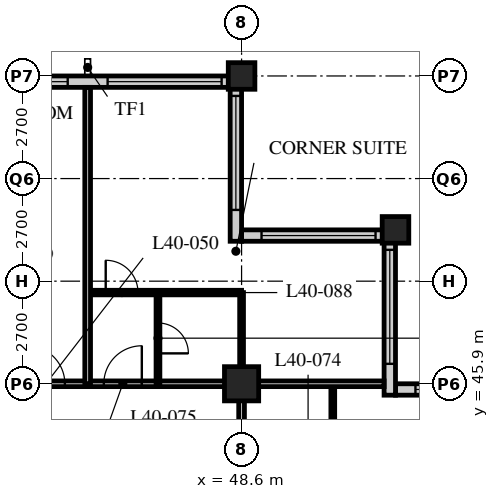
"""IFC4 building model, lengths in metres.
Left out: names, types, materials, properties, quantities, classifications, styles, units other than length and angle.
Written with IfcOpenShell. Run it as: python <this file> out.ifc"""

import sys

from ifc_helpers import new_model, si_unit, direction, frame, frame_2d, origin, origin_2d, place, context, subcontext, project, spatial, rectangle, hollow_rectangle, extrude, element, fill, save


model = new_model("IFC4")
c1 = context("Model", 3, precision=1e-05, world=origin(), true_north=direction((0.0, 1.0)))
c2 = subcontext(c1, "Body", "Model", "MODEL_VIEW")
j1 = project(units=[si_unit("LENGTHUNIT", "METRE"), si_unit("PLANEANGLEUNIT", "RADIAN")], contexts=[c1])
p1 = place(None, origin())
s1 = spatial("IfcSite", under=j1, at=p1, CompositionType="ELEMENT")
p2 = place(p1, origin())
s2 = spatial("IfcBuilding", under=s1, at=p2, CompositionType="ELEMENT")
p3 = place(p2, frame((0.0, 0.0, 154.4)))
s3 = spatial("IfcBuildingStorey", under=s2, at=p3, CompositionType="ELEMENT", Elevation=154.4)
p4 = place(p3, frame((48.6, 45.9, 0.0), z_axis=(0.0, 0.0, 1.0), x_axis=(1.0, 0.0, 0.0)))
e1 = element("IfcColumn", 1, at=p4, inside=s3, PredefinedType="COLUMN", context=c2, shape_type="SweptSolid", body=[
    extrude(hollow_rectangle(XDim=0.9, YDim=0.9, WallThickness=0.1, at=origin_2d()), origin(), (0.0, 0.0, 1.0), 3.4),
])
for number, where, z_axis, x_axis in (
    (2, (48.6, 54.0, 0.0), (0.0, 0.0, 1.0), (1.0, 0.0, 0.0)),
    (3, (52.65, 49.95, 0.0), (0.0, 0.0, 1.0), (1.0, 0.0, 0.0)),
):
    element("IfcColumn", number, at=place(p3, frame(where, z_axis=z_axis, x_axis=x_axis)), inside=s3, PredefinedType="COLUMN", context=c2, shape_type="SweptSolid", body=[
        extrude(hollow_rectangle(XDim=0.7, YDim=0.7, WallThickness=0.07, at=origin_2d()), origin(), (0.0, 0.0, 1.0), 3.4),
    ])
p5 = place(p3, frame((56.4, 45.75, 0.0), z_axis=(0.0, 0.0, 1.0), x_axis=(-1.0, 0.0, 0.0)))
e4 = element("IfcWall", 4, at=p5, inside=s3, PredefinedType="SOLIDWALL", context=c2, shape_type="SweptSolid", body=[
    extrude(rectangle(XDim=3.75, YDim=0.3, at=frame_2d((1.875, 0.0))), origin(), (0.0, 0.0, 1.0), 2.15),
])
p6 = place(p5, frame((0.225, 0.0, 0.9)))
e5 = element("IfcOpeningElement", 5, at=p6, cuts=e4, PredefinedType="OPENING", context=c2, shape_type="SweptSolid", body=[
    extrude(rectangle(XDim=3.0, YDim=1.2, at=frame_2d((1.5, 0.6))), frame((0.0, 0.16, 0.0), z_axis=(0.0, -1.0, 0.0), x_axis=(1.0, 0.0, 0.0)), (0.0, 0.0, 1.0), 0.32),
])
p7 = place(p3, frame((52.5, 45.6, 0.0), z_axis=(0.0, 0.0, 1.0), x_axis=(0.0, 1.0, 0.0)))
e6 = element("IfcWall", 6, at=p7, inside=s3, PredefinedType="SOLIDWALL", context=c2, shape_type="SweptSolid", body=[
    extrude(rectangle(XDim=4.35, YDim=0.3, at=frame_2d((2.175, 0.0))), origin(), (0.0, 0.0, 1.0), 2.45),
])
p8 = place(p7, frame((0.825, 0.0, 0.9)))
e7 = element("IfcOpeningElement", 7, at=p8, cuts=e6, PredefinedType="OPENING", context=c2, shape_type="SweptSolid", body=[
    extrude(rectangle(XDim=3.0, YDim=1.2, at=frame_2d((1.5, 0.6))), frame((0.0, 0.16, 0.0), z_axis=(0.0, -1.0, 0.0), x_axis=(1.0, 0.0, 0.0)), (0.0, 0.0, 1.0), 0.32),
])
p9 = place(p3, frame((52.35, 49.8, 0.0), z_axis=(0.0, 0.0, 1.0), x_axis=(-1.0, 0.0, 0.0)))
e8 = element("IfcWall", 8, at=p9, inside=s3, PredefinedType="SOLIDWALL", context=c2, shape_type="SweptSolid", body=[
    extrude(rectangle(XDim=3.75, YDim=0.3, at=frame_2d((1.875, 0.0))), origin(), (0.0, 0.0, 1.0), 2.45),
])
p10 = place(p9, frame((0.225, 0.0, 0.9)))
e9 = element("IfcOpeningElement", 9, at=p10, cuts=e8, PredefinedType="OPENING", context=c2, shape_type="SweptSolid", body=[
    extrude(rectangle(XDim=3.0, YDim=1.2, at=frame_2d((1.5, 0.6))), frame((0.0, 0.16, 0.0), z_axis=(0.0, -1.0, 0.0), x_axis=(1.0, 0.0, 0.0)), (0.0, 0.0, 1.0), 0.32),
])
p11 = place(p3, frame((48.45, 49.65, 0.0), z_axis=(0.0, 0.0, 1.0), x_axis=(0.0, 1.0, 0.0)))
e10 = element("IfcWall", 10, at=p11, inside=s3, PredefinedType="SOLIDWALL", context=c2, shape_type="SweptSolid", body=[
    extrude(rectangle(XDim=4.35, YDim=0.3, at=frame_2d((2.175, 0.0))), origin(), (0.0, 0.0, 1.0), 2.15),
])
p12 = place(p11, frame((0.825, 0.0, 0.9)))
e11 = element("IfcOpeningElement", 11, at=p12, cuts=e10, PredefinedType="OPENING", context=c2, shape_type="SweptSolid", body=[
    extrude(rectangle(XDim=3.0, YDim=1.2, at=frame_2d((1.5, 0.6))), frame((0.0, 0.16, 0.0), z_axis=(0.0, -1.0, 0.0), x_axis=(1.0, 0.0, 0.0)), (0.0, 0.0, 1.0), 0.32),
])
p13 = place(p3, frame((48.3, 53.85, 0.0), z_axis=(0.0, 0.0, 1.0), x_axis=(-1.0, 0.0, 0.0)))
e12 = element("IfcWall", 12, at=p13, inside=s3, PredefinedType="SOLIDWALL", context=c2, shape_type="SweptSolid", body=[
    extrude(rectangle(XDim=40.2, YDim=0.3, at=frame_2d((20.1, 0.0))), origin(), (0.0, 0.0, 1.0), 2.15),
])
p14 = place(p13, frame((0.225, 0.0, 0.9)))
e13 = element("IfcOpeningElement", 13, at=p14, cuts=e12, PredefinedType="OPENING", context=c2, shape_type="SweptSolid", body=[
    extrude(rectangle(XDim=3.0, YDim=1.2, at=frame_2d((1.5, 0.6))), frame((0.0, 0.16, 0.0), z_axis=(0.0, -1.0, 0.0), x_axis=(1.0, 0.0, 0.0)), (0.0, 0.0, 1.0), 0.32),
])
p15 = place(p13, frame((4.275, 0.0, 0.9)))
e14 = element("IfcOpeningElement", 14, at=p15, cuts=e12, PredefinedType="OPENING", context=c2, shape_type="SweptSolid", body=[
    extrude(rectangle(XDim=3.0, YDim=1.2, at=frame_2d((1.5, 0.6))), frame((0.0, 0.16, 0.0), z_axis=(0.0, -1.0, 0.0), x_axis=(1.0, 0.0, 0.0)), (0.0, 0.0, 1.0), 0.32),
])
p16 = place(p13, frame((8.325, 0.0, 0.9)))
e15 = element("IfcOpeningElement", 15, at=p16, cuts=e12, PredefinedType="OPENING", context=c2, shape_type="SweptSolid", body=[
    extrude(rectangle(XDim=3.0, YDim=1.2, at=frame_2d((1.5, 0.6))), frame((0.0, 0.16, 0.0), z_axis=(0.0, -1.0, 0.0), x_axis=(1.0, 0.0, 0.0)), (0.0, 0.0, 1.0), 0.32),
])
p17 = place(p13, frame((12.375, 0.0, 0.9)))
e16 = element("IfcOpeningElement", 16, at=p17, cuts=e12, PredefinedType="OPENING", context=c2, shape_type="SweptSolid", body=[
    extrude(rectangle(XDim=3.0, YDim=1.2, at=frame_2d((1.5, 0.6))), frame((0.0, 0.16, 0.0), z_axis=(0.0, -1.0, 0.0), x_axis=(1.0, 0.0, 0.0)), (0.0, 0.0, 1.0), 0.32),
])
p18 = place(p13, frame((16.425, 0.0, 0.9)))
e17 = element("IfcOpeningElement", 17, at=p18, cuts=e12, PredefinedType="OPENING", context=c2, shape_type="SweptSolid", body=[
    extrude(rectangle(XDim=3.0, YDim=1.2, at=frame_2d((1.5, 0.6))), frame((0.0, 0.16, 0.0), z_axis=(0.0, -1.0, 0.0), x_axis=(1.0, 0.0, 0.0)), (0.0, 0.0, 1.0), 0.32),
])
p19 = place(p13, frame((20.475, 0.0, 0.9)))
e18 = element("IfcOpeningElement", 18, at=p19, cuts=e12, PredefinedType="OPENING", context=c2, shape_type="SweptSolid", body=[
    extrude(rectangle(XDim=3.0, YDim=1.2, at=frame_2d((1.5, 0.6))), frame((0.0, 0.16, 0.0), z_axis=(0.0, -1.0, 0.0), x_axis=(1.0, 0.0, 0.0)), (0.0, 0.0, 1.0), 0.32),
])
p20 = place(p13, frame((24.525, 0.0, 0.9)))
e19 = element("IfcOpeningElement", 19, at=p20, cuts=e12, PredefinedType="OPENING", context=c2, shape_type="SweptSolid", body=[
    extrude(rectangle(XDim=3.0, YDim=1.2, at=frame_2d((1.5, 0.6))), frame((0.0, 0.16, 0.0), z_axis=(0.0, -1.0, 0.0), x_axis=(1.0, 0.0, 0.0)), (0.0, 0.0, 1.0), 0.32),
])
p21 = place(p13, frame((28.575, 0.0, 0.9)))
e20 = element("IfcOpeningElement", 20, at=p21, cuts=e12, PredefinedType="OPENING", context=c2, shape_type="SweptSolid", body=[
    extrude(rectangle(XDim=3.0, YDim=1.2, at=frame_2d((1.5, 0.6))), frame((0.0, 0.16, 0.0), z_axis=(0.0, -1.0, 0.0), x_axis=(1.0, 0.0, 0.0)), (0.0, 0.0, 1.0), 0.32),
])
p22 = place(p13, frame((32.625, 0.0, 0.9)))
e21 = element("IfcOpeningElement", 21, at=p22, cuts=e12, PredefinedType="OPENING", context=c2, shape_type="SweptSolid", body=[
    extrude(rectangle(XDim=3.0, YDim=1.2, at=frame_2d((1.5, 0.6))), frame((0.0, 0.16, 0.0), z_axis=(0.0, -1.0, 0.0), x_axis=(1.0, 0.0, 0.0)), (0.0, 0.0, 1.0), 0.32),
])
p23 = place(p13, frame((36.675, 0.0, 0.9)))
e22 = element("IfcOpeningElement", 22, at=p23, cuts=e12, PredefinedType="OPENING", context=c2, shape_type="SweptSolid", body=[
    extrude(rectangle(XDim=3.0, YDim=1.2, at=frame_2d((1.5, 0.6))), frame((0.0, 0.16, 0.0), z_axis=(0.0, -1.0, 0.0), x_axis=(1.0, 0.0, 0.0)), (0.0, 0.0, 1.0), 0.32),
])
p24 = place(p3, frame((8.1, 45.9, 0.0), z_axis=(0.0, 0.0, 1.0), x_axis=(1.0, 0.0, 0.0)))
e23 = element("IfcWall", 23, at=p24, inside=s3, PredefinedType="PARTITIONING", context=c2, shape_type="SweptSolid", body=[
    extrude(rectangle(XDim=40.5, YDim=0.15, at=frame_2d((20.25, 0.0))), origin(), (0.0, 0.0, 1.0), 2.15),
])
p25 = place(p24, frame((9.625, 0.0, 0.0)))
e24 = element("IfcOpeningElement", 24, at=p25, cuts=e23, PredefinedType="OPENING", context=c2, shape_type="SweptSolid", body=[
    extrude(rectangle(XDim=1.0, YDim=2.1, at=frame_2d((0.5, 1.05))), frame((0.0, 0.085, 0.0), z_axis=(0.0, -1.0, 0.0), x_axis=(1.0, 0.0, 0.0)), (0.0, 0.0, 1.0), 0.17),
])
p26 = place(p24, frame((21.775, 0.0, 0.0)))
e25 = element("IfcOpeningElement", 25, at=p26, cuts=e23, PredefinedType="OPENING", context=c2, shape_type="SweptSolid", body=[
    extrude(rectangle(XDim=1.0, YDim=2.1, at=frame_2d((0.5, 1.05))), frame((0.0, 0.085, 0.0), z_axis=(0.0, -1.0, 0.0), x_axis=(1.0, 0.0, 0.0)), (0.0, 0.0, 1.0), 0.17),
])
p27 = place(p24, frame((28.95, 0.0, 0.0)))
e26 = element("IfcOpeningElement", 26, at=p27, cuts=e23, PredefinedType="OPENING", context=c2, shape_type="SweptSolid", body=[
    extrude(rectangle(XDim=1.0, YDim=2.1, at=frame_2d((0.5, 1.05))), frame((0.0, 0.085, 0.0), z_axis=(0.0, -1.0, 0.0), x_axis=(1.0, 0.0, 0.0)), (0.0, 0.0, 1.0), 0.17),
])
p28 = place(p24, frame((34.85, 0.0, 0.0)))
e27 = element("IfcOpeningElement", 27, at=p28, cuts=e23, PredefinedType="OPENING", context=c2, shape_type="SweptSolid", body=[
    extrude(rectangle(XDim=1.0, YDim=2.1, at=frame_2d((0.5, 1.05))), frame((0.0, 0.085, 0.0), z_axis=(0.0, -1.0, 0.0), x_axis=(1.0, 0.0, 0.0)), (0.0, 0.0, 1.0), 0.17),
])
p29 = place(p24, frame((36.875, 0.0, 0.0)))
e28 = element("IfcOpeningElement", 28, at=p29, cuts=e23, PredefinedType="OPENING", context=c2, shape_type="SweptSolid", body=[
    extrude(rectangle(XDim=1.0, YDim=2.1, at=frame_2d((0.5, 1.05))), frame((0.0, 0.085, 0.0), z_axis=(0.0, -1.0, 0.0), x_axis=(1.0, 0.0, 0.0)), (0.0, 0.0, 1.0), 0.17),
])
p30 = place(p24, frame((2.625, 0.0, 0.0)))
e29 = element("IfcOpeningElement", 29, at=p30, cuts=e23, PredefinedType="OPENING", context=c2, shape_type="SweptSolid", body=[
    extrude(rectangle(XDim=1.0, YDim=2.1, at=frame_2d((0.5, 1.05))), frame((0.0, 0.085, 0.0), z_axis=(0.0, -1.0, 0.0), x_axis=(1.0, 0.0, 0.0)), (0.0, 0.0, 1.0), 0.17),
])
p31 = place(p3, frame((48.6, 17.55, 0.0), z_axis=(0.0, 0.0, 1.0), x_axis=(0.0, 1.0, 0.0)))
e30 = element("IfcWall", 30, at=p31, inside=s3, PredefinedType="PARTITIONING", context=c2, shape_type="SweptSolid", body=[
    extrude(rectangle(XDim=28.35, YDim=0.15, at=frame_2d((14.175, 0.0))), origin(), (0.0, 0.0, 1.0), 2.15),
])
p32 = place(p31, frame((0.3, 0.0, 0.0)))
e31 = element("IfcOpeningElement", 31, at=p32, cuts=e30, PredefinedType="OPENING", context=c2, shape_type="SweptSolid", body=[
    extrude(rectangle(XDim=1.0, YDim=2.1, at=frame_2d((0.5, 1.05))), frame((0.0, 0.085, 0.0), z_axis=(0.0, -1.0, 0.0), x_axis=(1.0, 0.0, 0.0)), (0.0, 0.0, 1.0), 0.17),
])
p33 = place(p31, frame((6.5, 0.0, 0.0)))
e32 = element("IfcOpeningElement", 32, at=p33, cuts=e30, PredefinedType="OPENING", context=c2, shape_type="SweptSolid", body=[
    extrude(rectangle(XDim=1.0, YDim=2.1, at=frame_2d((0.5, 1.05))), frame((0.0, 0.085, 0.0), z_axis=(0.0, -1.0, 0.0), x_axis=(1.0, 0.0, 0.0)), (0.0, 0.0, 1.0), 0.17),
])
p34 = place(p31, frame((13.675, 0.0, 0.0)))
e33 = element("IfcOpeningElement", 33, at=p34, cuts=e30, PredefinedType="OPENING", context=c2, shape_type="SweptSolid", body=[
    extrude(rectangle(XDim=1.0, YDim=2.1, at=frame_2d((0.5, 1.05))), frame((0.0, 0.085, 0.0), z_axis=(0.0, -1.0, 0.0), x_axis=(1.0, 0.0, 0.0)), (0.0, 0.0, 1.0), 0.17),
])
p35 = place(p31, frame((22.7, 0.0, 0.0)))
e34 = element("IfcOpeningElement", 34, at=p35, cuts=e30, PredefinedType="OPENING", context=c2, shape_type="SweptSolid", body=[
    extrude(rectangle(XDim=1.0, YDim=2.1, at=frame_2d((0.5, 1.05))), frame((0.0, 0.085, 0.0), z_axis=(0.0, -1.0, 0.0), x_axis=(1.0, 0.0, 0.0)), (0.0, 0.0, 1.0), 0.17),
])
p36 = place(p31, frame((24.9, 0.0, 0.0)))
e35 = element("IfcOpeningElement", 35, at=p36, cuts=e30, PredefinedType="OPENING", context=c2, shape_type="SweptSolid", body=[
    extrude(rectangle(XDim=1.0, YDim=2.1, at=frame_2d((0.5, 1.05))), frame((0.0, 0.085, 0.0), z_axis=(0.0, -1.0, 0.0), x_axis=(1.0, 0.0, 0.0)), (0.0, 0.0, 1.0), 0.17),
])
p37 = place(p3, frame((51.0, 43.6, 0.0), z_axis=(0.0, 0.0, 1.0), x_axis=(0.0, 1.0, 0.0)))
e36 = element("IfcWall", 36, at=p37, inside=s3, PredefinedType="PARTITIONING", context=c2, shape_type="SweptSolid", body=[
    extrude(rectangle(XDim=2.3, YDim=0.1, at=frame_2d((1.15, 0.0))), origin(), (0.0, 0.0, 1.0), 3.15),
])
p38 = place(p3, frame((44.55, 48.3, 0.0), z_axis=(0.0, 0.0, 1.0), x_axis=(1.0, 0.0, 0.0)))
e37 = element("IfcWall", 37, at=p38, inside=s3, PredefinedType="PARTITIONING", context=c2, shape_type="SweptSolid", body=[
    extrude(rectangle(XDim=4.05, YDim=0.12, at=frame_2d((2.025, 0.0))), origin(), (0.0, 0.0, 1.0), 3.15),
])
p39 = place(p38, frame((0.475, 0.0, 0.0)))
e38 = element("IfcOpeningElement", 38, at=p39, cuts=e37, PredefinedType="OPENING", context=c2, shape_type="SweptSolid", body=[
    extrude(rectangle(XDim=0.85, YDim=2.1, at=frame_2d((0.425, 1.05))), frame((0.0, 0.07, 0.0), z_axis=(0.0, -1.0, 0.0), x_axis=(1.0, 0.0, 0.0)), (0.0, 0.0, 1.0), 0.14),
])
p40 = place(p3, frame((46.4, 45.9, 0.0), z_axis=(0.0, 0.0, 1.0), x_axis=(0.0, 1.0, 0.0)))
e39 = element("IfcWall", 39, at=p40, inside=s3, PredefinedType="PARTITIONING", context=c2, shape_type="SweptSolid", body=[
    extrude(rectangle(XDim=2.4, YDim=0.1, at=frame_2d((1.2, 0.0))), origin(), (0.0, 0.0, 1.0), 3.15),
])
p41 = place(p40, frame((0.8, 0.0, 0.0)))
e40 = element("IfcOpeningElement", 40, at=p41, cuts=e39, PredefinedType="OPENING", context=c2, shape_type="SweptSolid", body=[
    extrude(rectangle(XDim=0.8, YDim=2.1, at=frame_2d((0.4, 1.05))), frame((0.0, 0.06, 0.0), z_axis=(0.0, -1.0, 0.0), x_axis=(1.0, 0.0, 0.0)), (0.0, 0.0, 1.0), 0.12),
])
p42 = place(p3, frame((48.6, 45.9, 0.0), z_axis=(0.0, 0.0, 1.0), x_axis=(0.0, 1.0, 0.0)))
e41 = element("IfcWall", 41, at=p42, inside=s3, PredefinedType="PARTITIONING", context=c2, shape_type="SweptSolid", body=[
    extrude(rectangle(XDim=2.4, YDim=0.1, at=frame_2d((1.2, 0.0))), origin(), (0.0, 0.0, 1.0), 2.15),
])
p43 = place(p3, frame((48.6, 45.9, 0.0), z_axis=(0.0, 0.0, 1.0), x_axis=(1.0, 0.0, 0.0)))
e42 = element("IfcWall", 42, at=p43, inside=s3, PredefinedType="PARTITIONING", context=c2, shape_type="SweptSolid", body=[
    extrude(rectangle(XDim=3.75, YDim=0.15, at=frame_2d((1.875, 0.0))), origin(), (0.0, 0.0, 1.0), 2.15),
])
p44 = place(p3, frame((44.55, 45.9, 0.0), z_axis=(0.0, 0.0, 1.0), x_axis=(0.0, 1.0, 0.0)))
e43 = element("IfcWall", 43, at=p44, inside=s3, PredefinedType="PARTITIONING", context=c2, shape_type="SweptSolid", body=[
    extrude(rectangle(XDim=7.8, YDim=0.15, at=frame_2d((3.9, 0.0))), origin(), (0.0, 0.0, 1.0), 3.15),
])
p45 = place(p6, origin())
e44 = element("IfcWindow", 44, at=p45, inside=s3, PartitioningType="SINGLE_PANEL", PredefinedType="WINDOW", context=c2, shape_type="SweptSolid", body=[
    extrude(rectangle(XDim=3.0, YDim=1.2, at=frame_2d((1.5, 0.6))), frame((0.0, 0.03, 0.0), z_axis=(0.0, -1.0, 0.0), x_axis=(1.0, 0.0, 0.0)), (0.0, 0.0, 1.0), 0.06),
])
fill(e5, e44)
p46 = place(p8, origin())
e45 = element("IfcWindow", 45, at=p46, inside=s3, PartitioningType="SINGLE_PANEL", PredefinedType="WINDOW", context=c2, shape_type="SweptSolid", body=[
    extrude(rectangle(XDim=3.0, YDim=1.2, at=frame_2d((1.5, 0.6))), frame((0.0, 0.03, 0.0), z_axis=(0.0, -1.0, 0.0), x_axis=(1.0, 0.0, 0.0)), (0.0, 0.0, 1.0), 0.06),
])
fill(e7, e45)
p47 = place(p10, origin())
e46 = element("IfcWindow", 46, at=p47, inside=s3, PartitioningType="SINGLE_PANEL", PredefinedType="WINDOW", context=c2, shape_type="SweptSolid", body=[
    extrude(rectangle(XDim=3.0, YDim=1.2, at=frame_2d((1.5, 0.6))), frame((0.0, 0.03, 0.0), z_axis=(0.0, -1.0, 0.0), x_axis=(1.0, 0.0, 0.0)), (0.0, 0.0, 1.0), 0.06),
])
fill(e9, e46)
p48 = place(p12, origin())
e47 = element("IfcWindow", 47, at=p48, inside=s3, PartitioningType="SINGLE_PANEL", PredefinedType="WINDOW", context=c2, shape_type="SweptSolid", body=[
    extrude(rectangle(XDim=3.0, YDim=1.2, at=frame_2d((1.5, 0.6))), frame((0.0, 0.03, 0.0), z_axis=(0.0, -1.0, 0.0), x_axis=(1.0, 0.0, 0.0)), (0.0, 0.0, 1.0), 0.06),
])
fill(e11, e47)
p49 = place(p14, origin())
e48 = element("IfcWindow", 48, at=p49, inside=s3, PartitioningType="SINGLE_PANEL", PredefinedType="WINDOW", context=c2, shape_type="SweptSolid", body=[
    extrude(rectangle(XDim=3.0, YDim=1.2, at=frame_2d((1.5, 0.6))), frame((0.0, 0.03, 0.0), z_axis=(0.0, -1.0, 0.0), x_axis=(1.0, 0.0, 0.0)), (0.0, 0.0, 1.0), 0.06),
])
fill(e13, e48)
p50 = place(p15, origin())
e49 = element("IfcWindow", 49, at=p50, inside=s3, PartitioningType="SINGLE_PANEL", PredefinedType="WINDOW", context=c2, shape_type="SweptSolid", body=[
    extrude(rectangle(XDim=3.0, YDim=1.2, at=frame_2d((1.5, 0.6))), frame((0.0, 0.03, 0.0), z_axis=(0.0, -1.0, 0.0), x_axis=(1.0, 0.0, 0.0)), (0.0, 0.0, 1.0), 0.06),
])
fill(e14, e49)
p51 = place(p28, origin())
e50 = element("IfcDoor", 50, at=p51, inside=s3, OperationType="SINGLE_SWING_LEFT", PredefinedType="DOOR", context=c2, shape_type="SweptSolid", body=[
    extrude(rectangle(XDim=1.0, YDim=2.1, at=frame_2d((0.5, 1.05))), frame((0.0, 0.025, 0.0), z_axis=(0.0, -1.0, 0.0), x_axis=(1.0, 0.0, 0.0)), (0.0, 0.0, 1.0), 0.05),
])
fill(e27, e50)
p52 = place(p41, origin())
e51 = element("IfcDoor", 51, at=p52, inside=s3, OperationType="SINGLE_SWING_RIGHT", PredefinedType="DOOR", context=c2, shape_type="SweptSolid", body=[
    extrude(rectangle(XDim=0.8, YDim=2.1, at=frame_2d((0.4, 1.05))), frame((0.0, 0.025, 0.0), z_axis=(0.0, -1.0, 0.0), x_axis=(1.0, 0.0, 0.0)), (0.0, 0.0, 1.0), 0.05),
])
fill(e40, e51)
p53 = place(p29, origin())
e52 = element("IfcDoor", 52, at=p53, inside=s3, OperationType="SINGLE_SWING_RIGHT", PredefinedType="DOOR", context=c2, shape_type="SweptSolid", body=[
    extrude(rectangle(XDim=1.0, YDim=2.1, at=frame_2d((0.5, 1.05))), frame((0.0, 0.025, 0.0), z_axis=(0.0, -1.0, 0.0), x_axis=(1.0, 0.0, 0.0)), (0.0, 0.0, 1.0), 0.05),
])
fill(e28, e52)
p54 = place(p39, origin())
e53 = element("IfcDoor", 53, at=p54, inside=s3, OperationType="SINGLE_SWING_LEFT", PredefinedType="DOOR", context=c2, shape_type="SweptSolid", body=[
    extrude(rectangle(XDim=0.85, YDim=2.1, at=frame_2d((0.425, 1.05))), frame((0.0, 0.025, 0.0), z_axis=(0.0, -1.0, 0.0), x_axis=(1.0, 0.0, 0.0)), (0.0, 0.0, 1.0), 0.05),
])
fill(e38, e53)
save(model, sys.argv[1])
